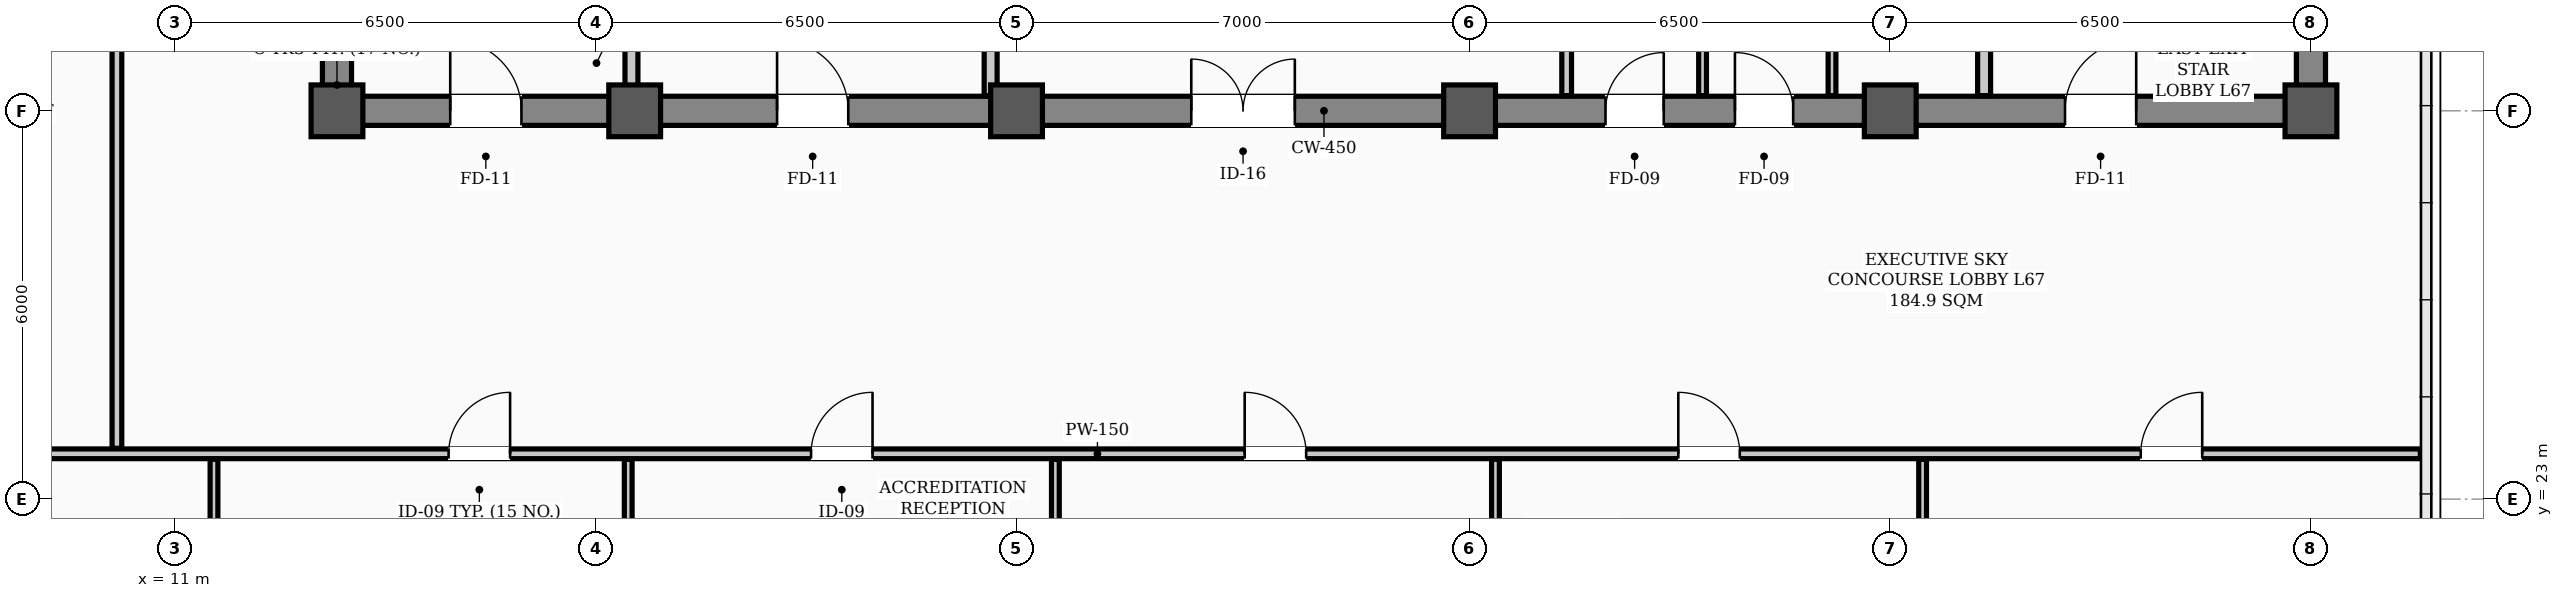
"""IFC4 building model, lengths in metres.
Left out: names, types, materials, properties, quantities, classifications, styles, units other than length and angle.
Written with IfcOpenShell. Run it as: python <this file> out.ifc"""

import sys

from ifc_helpers import new_model, si_unit, direction, frame, frame_2d, origin, origin_2d, place, context, subcontext, project, spatial, rectangle, hollow_rectangle, extrude, element, fill, save


model = new_model("IFC4")
c1 = context("Model", 3, precision=1e-05, world=origin(), true_north=direction((0.0, 1.0)))
c2 = subcontext(c1, "Body", "Model", "MODEL_VIEW")
j1 = project(units=[si_unit("LENGTHUNIT", "METRE"), si_unit("PLANEANGLEUNIT", "RADIAN")], contexts=[c1])
p1 = place(None, origin())
s1 = spatial("IfcSite", under=j1, at=p1, CompositionType="ELEMENT")
p2 = place(p1, origin())
s2 = spatial("IfcBuilding", under=s1, at=p2, CompositionType="ELEMENT")
p3 = place(p2, frame((0.0, 0.0, 269.6)))
s3 = spatial("IfcBuildingStorey", under=s2, at=p3, CompositionType="ELEMENT", Elevation=269.6)
for number, where, z_axis, x_axis in (
    (1, (13.5, 29.0, 0.0), (0.0, 0.0, 1.0), (1.0, 0.0, 0.0)),
    (2, (18.1, 29.0, 0.0), (0.0, 0.0, 1.0), (1.0, 0.0, 0.0)),
    (3, (24.0, 29.0, 0.0), (0.0, 0.0, 1.0), (1.0, 0.0, 0.0)),
    (4, (31.0, 29.0, 0.0), (0.0, 0.0, 1.0), (1.0, 0.0, 0.0)),
    (5, (37.5, 29.0, 0.0), (0.0, 0.0, 1.0), (1.0, 0.0, 0.0)),
    (6, (44.0, 29.0, 0.0), (0.0, 0.0, 1.0), (1.0, 0.0, 0.0)),
):
    element("IfcColumn", number, at=place(p3, frame(where, z_axis=z_axis, x_axis=x_axis)), inside=s3, PredefinedType="COLUMN", context=c2, shape_type="SweptSolid", body=[
        extrude(hollow_rectangle(XDim=0.8, YDim=0.8, WallThickness=0.032, InnerFilletRadius=0.016, OuterFilletRadius=0.048, at=origin_2d()), origin(), (0.0, 0.0, 1.0), 3.9),
    ])
p4 = place(p3, frame((13.5, 29.0, 0.0), z_axis=(0.0, 0.0, 1.0), x_axis=(1.0, 0.0, 0.0)))
e7 = element("IfcWall", 7, at=p4, inside=s3, PredefinedType="SHEAR", context=c2, shape_type="SweptSolid", body=[
    extrude(rectangle(XDim=30.5, YDim=0.45, at=frame_2d((15.25, 0.0))), origin(), (0.0, 0.0, 1.0), 3.72),
])
p5 = place(p4, frame((1.75, 0.0, 0.0)))
e8 = element("IfcOpeningElement", 8, at=p5, cuts=e7, PredefinedType="OPENING", context=c2, shape_type="SweptSolid", body=[
    extrude(rectangle(XDim=1.1, YDim=2.08, at=frame_2d((0.55, 1.04))), frame((0.0, 0.235, 0.0), z_axis=(0.0, -1.0, 0.0), x_axis=(1.0, 0.0, 0.0)), (0.0, 0.0, 1.0), 0.47),
])
p6 = place(p4, frame((26.7, 0.0, 0.0)))
e9 = element("IfcOpeningElement", 9, at=p6, cuts=e7, PredefinedType="OPENING", context=c2, shape_type="SweptSolid", body=[
    extrude(rectangle(XDim=1.1, YDim=2.08, at=frame_2d((0.55, 1.04))), frame((0.0, 0.235, 0.0), z_axis=(0.0, -1.0, 0.0), x_axis=(1.0, 0.0, 0.0)), (0.0, 0.0, 1.0), 0.47),
])
p7 = place(p4, frame((6.8, 0.0, 0.0)))
e10 = element("IfcOpeningElement", 10, at=p7, cuts=e7, PredefinedType="OPENING", context=c2, shape_type="SweptSolid", body=[
    extrude(rectangle(XDim=1.1, YDim=2.08, at=frame_2d((0.55, 1.04))), frame((0.0, 0.235, 0.0), z_axis=(0.0, -1.0, 0.0), x_axis=(1.0, 0.0, 0.0)), (0.0, 0.0, 1.0), 0.47),
])
p8 = place(p4, frame((13.2, 0.0, 0.0)))
e11 = element("IfcOpeningElement", 11, at=p8, cuts=e7, PredefinedType="OPENING", context=c2, shape_type="SweptSolid", body=[
    extrude(rectangle(XDim=1.6, YDim=2.08, at=frame_2d((0.8, 1.04))), frame((0.0, 0.235, 0.0), z_axis=(0.0, -1.0, 0.0), x_axis=(1.0, 0.0, 0.0)), (0.0, 0.0, 1.0), 0.47),
])
p9 = place(p4, frame((19.6, 0.0, 0.0)))
e12 = element("IfcOpeningElement", 12, at=p9, cuts=e7, PredefinedType="OPENING", context=c2, shape_type="SweptSolid", body=[
    extrude(rectangle(XDim=0.9, YDim=2.08, at=frame_2d((0.45, 1.04))), frame((0.0, 0.235, 0.0), z_axis=(0.0, -1.0, 0.0), x_axis=(1.0, 0.0, 0.0)), (0.0, 0.0, 1.0), 0.47),
])
p10 = place(p4, frame((21.6, 0.0, 0.0)))
e13 = element("IfcOpeningElement", 13, at=p10, cuts=e7, PredefinedType="OPENING", context=c2, shape_type="SweptSolid", body=[
    extrude(rectangle(XDim=0.9, YDim=2.08, at=frame_2d((0.45, 1.04))), frame((0.0, 0.235, 0.0), z_axis=(0.0, -1.0, 0.0), x_axis=(1.0, 0.0, 0.0)), (0.0, 0.0, 1.0), 0.47),
])
for number, where, z_axis, x_axis in (
    (14, (13.5, 29.35, 0.0), (0.0, 0.0, 1.0), (0.0, 1.0, 0.0)),
    (15, (44.0, 29.35, 0.0), (0.0, 0.0, 1.0), (0.0, 1.0, 0.0)),
):
    element("IfcWall", number, at=place(p3, frame(where, z_axis=z_axis, x_axis=x_axis)), inside=s3, PredefinedType="SHEAR", context=c2, shape_type="SweptSolid", body=[
        extrude(rectangle(XDim=8.6, YDim=0.45, at=frame_2d((4.3, 0.0))), origin(), (0.0, 0.0, 1.0), 3.72),
    ])
p11 = place(p3, frame((4.81, 23.7, 0.0), z_axis=(0.0, 0.0, 1.0), x_axis=(1.0, 0.0, 0.0)))
e16 = element("IfcWall", 16, at=p11, inside=s3, PredefinedType="PARTITIONING", context=c2, shape_type="SweptSolid", body=[
    extrude(rectangle(XDim=40.88, YDim=0.15, at=frame_2d((20.44, 0.0))), origin(), (0.0, 0.0, 1.0), 3.2),
])
p12 = place(p11, frame((10.415, 0.0, 0.0)))
e17 = element("IfcOpeningElement", 17, at=p12, cuts=e16, PredefinedType="OPENING", context=c2, shape_type="SweptSolid", body=[
    extrude(rectangle(XDim=0.95, YDim=2.08, at=frame_2d((0.475, 1.04))), frame((0.0, 0.085, 0.0), z_axis=(0.0, -1.0, 0.0), x_axis=(1.0, 0.0, 0.0)), (0.0, 0.0, 1.0), 0.17),
])
p13 = place(p11, frame((16.015, 0.0, 0.0)))
e18 = element("IfcOpeningElement", 18, at=p13, cuts=e16, PredefinedType="OPENING", context=c2, shape_type="SweptSolid", body=[
    extrude(rectangle(XDim=0.95, YDim=2.08, at=frame_2d((0.475, 1.04))), frame((0.0, 0.085, 0.0), z_axis=(0.0, -1.0, 0.0), x_axis=(1.0, 0.0, 0.0)), (0.0, 0.0, 1.0), 0.17),
])
p14 = place(p11, frame((22.715, 0.0, 0.0)))
e19 = element("IfcOpeningElement", 19, at=p14, cuts=e16, PredefinedType="OPENING", context=c2, shape_type="SweptSolid", body=[
    extrude(rectangle(XDim=0.95, YDim=2.08, at=frame_2d((0.475, 1.04))), frame((0.0, 0.085, 0.0), z_axis=(0.0, -1.0, 0.0), x_axis=(1.0, 0.0, 0.0)), (0.0, 0.0, 1.0), 0.17),
])
p15 = place(p11, frame((29.415, 0.0, 0.0)))
e20 = element("IfcOpeningElement", 20, at=p15, cuts=e16, PredefinedType="OPENING", context=c2, shape_type="SweptSolid", body=[
    extrude(rectangle(XDim=0.95, YDim=2.08, at=frame_2d((0.475, 1.04))), frame((0.0, 0.085, 0.0), z_axis=(0.0, -1.0, 0.0), x_axis=(1.0, 0.0, 0.0)), (0.0, 0.0, 1.0), 0.17),
])
p16 = place(p11, frame((36.56, 0.0, 0.0)))
e21 = element("IfcOpeningElement", 21, at=p16, cuts=e16, PredefinedType="OPENING", context=c2, shape_type="SweptSolid", body=[
    extrude(rectangle(XDim=0.95, YDim=2.08, at=frame_2d((0.475, 1.04))), frame((0.0, 0.085, 0.0), z_axis=(0.0, -1.0, 0.0), x_axis=(1.0, 0.0, 0.0)), (0.0, 0.0, 1.0), 0.17),
])
p17 = place(p3, frame((18.05, 29.235, 0.0), z_axis=(0.0, 0.0, 1.0), x_axis=(0.0, 1.0, 0.0)))
e22 = element("IfcWall", 22, at=p17, inside=s3, PredefinedType="STANDARD", context=c2, shape_type="SweptSolid", body=[
    extrude(rectangle(XDim=1.065, YDim=0.2, at=frame_2d((0.532, 0.0))), origin(), (0.0, 0.0, 1.0), 3.4),
])
p18 = place(p3, frame((38.95, 29.235, 0.0), z_axis=(0.0, 0.0, 1.0), x_axis=(0.0, 1.0, 0.0)))
e23 = element("IfcWall", 23, at=p18, inside=s3, PredefinedType="STANDARD", context=c2, shape_type="SweptSolid", body=[
    extrude(rectangle(XDim=1.065, YDim=0.2, at=frame_2d((0.532, 0.0))), origin(), (0.0, 0.0, 1.0), 3.72),
])
p19 = place(p3, frame((23.6, 29.235, 0.0), z_axis=(0.0, 0.0, 1.0), x_axis=(0.0, 1.0, 0.0)))
e24 = element("IfcWall", 24, at=p19, inside=s3, PredefinedType="STANDARD", context=c2, shape_type="SweptSolid", body=[
    extrude(rectangle(XDim=5.465, YDim=0.2, at=frame_2d((2.732, 0.0))), origin(), (0.0, 0.0, 1.0), 3.2),
])
p20 = place(p3, frame((32.5, 29.235, 0.0), z_axis=(0.0, 0.0, 1.0), x_axis=(0.0, 1.0, 0.0)))
e25 = element("IfcWall", 25, at=p20, inside=s3, PredefinedType="PARTITIONING", context=c2, shape_type="SweptSolid", body=[
    extrude(rectangle(XDim=2.53, YDim=0.15, at=frame_2d((1.265, 0.0))), origin(), (0.0, 0.0, 1.0), 3.4),
])
for number, where, z_axis, x_axis in (
    (26, (36.6, 29.235, 0.0), (0.0, 0.0, 1.0), (0.0, 1.0, 0.0)),
    (27, (34.6, 29.235, 0.0), (0.0, 0.0, 1.0), (0.0, 1.0, 0.0)),
):
    element("IfcWall", number, at=place(p3, frame(where, z_axis=z_axis, x_axis=x_axis)), inside=s3, PredefinedType="PARTITIONING", context=c2, shape_type="SweptSolid", body=[
        extrude(rectangle(XDim=2.53, YDim=0.12, at=frame_2d((1.265, 0.0))), origin(), (0.0, 0.0, 1.0), 3.4),
    ])
p21 = place(p3, frame((10.1, 23.785, 0.0), z_axis=(0.0, 0.0, 1.0), x_axis=(0.0, 1.0, 0.0)))
e28 = element("IfcWall", 28, at=p21, inside=s3, PredefinedType="PARTITIONING", context=c2, shape_type="SweptSolid", body=[
    extrude(rectangle(XDim=17.88, YDim=0.15, at=frame_2d((8.94, 0.0))), origin(), (0.0, 0.0, 1.0), 3.1),
])
p22 = place(p21, frame((8.465, 0.0, 0.0)))
e29 = element("IfcOpeningElement", 29, at=p22, cuts=e28, PredefinedType="OPENING", context=c2, shape_type="SweptSolid", body=[
    extrude(rectangle(XDim=0.95, YDim=2.08, at=frame_2d((0.475, 1.04))), frame((0.0, 0.085, 0.0), z_axis=(0.0, -1.0, 0.0), x_axis=(1.0, 0.0, 0.0)), (0.0, 0.0, 1.0), 0.17),
])
p23 = place(p3, frame((11.6, 17.91, 0.0), z_axis=(0.0, 0.0, 1.0), x_axis=(0.0, 1.0, 0.0)))
e30 = element("IfcWall", 30, at=p23, inside=s3, PredefinedType="PARTITIONING", context=c2, shape_type="SweptSolid", body=[
    extrude(rectangle(XDim=5.705, YDim=0.12, at=frame_2d((2.853, 0.0))), origin(), (0.0, 0.0, 1.0), 3.72),
])
p24 = place(p23, frame((3.815, 0.0, 0.0)))
e31 = element("IfcOpeningElement", 31, at=p24, cuts=e30, PredefinedType="OPENING", context=c2, shape_type="SweptSolid", body=[
    extrude(rectangle(XDim=0.95, YDim=2.08, at=frame_2d((0.475, 1.04))), frame((0.0, 0.07, 0.0), z_axis=(0.0, -1.0, 0.0), x_axis=(1.0, 0.0, 0.0)), (0.0, 0.0, 1.0), 0.14),
])
p25 = place(p3, frame((18.0, 17.91, 0.0), z_axis=(0.0, 0.0, 1.0), x_axis=(0.0, 1.0, 0.0)))
e32 = element("IfcWall", 32, at=p25, inside=s3, PredefinedType="PARTITIONING", context=c2, shape_type="SweptSolid", body=[
    extrude(rectangle(XDim=5.705, YDim=0.12, at=frame_2d((2.853, 0.0))), origin(), (0.0, 0.0, 1.0), 3.1),
])
p26 = place(p3, frame((24.6, 19.67, 0.0), z_axis=(0.0, 0.0, 1.0), x_axis=(0.0, 1.0, 0.0)))
e33 = element("IfcWall", 33, at=p26, inside=s3, PredefinedType="PARTITIONING", context=c2, shape_type="SweptSolid", body=[
    extrude(rectangle(XDim=3.945, YDim=0.12, at=frame_2d((1.973, 0.0))), origin(), (0.0, 0.0, 1.0), 3.1),
])
for number, where, z_axis, x_axis in (
    (34, (31.4, 17.91, 0.0), (0.0, 0.0, 1.0), (0.0, 1.0, 0.0)),
    (35, (38.0, 17.91, 0.0), (0.0, 0.0, 1.0), (0.0, 1.0, 0.0)),
):
    element("IfcWall", number, at=place(p3, frame(where, z_axis=z_axis, x_axis=x_axis)), inside=s3, PredefinedType="PARTITIONING", context=c2, shape_type="SweptSolid", body=[
        extrude(rectangle(XDim=5.705, YDim=0.12, at=frame_2d((2.853, 0.0))), origin(), (0.0, 0.0, 1.0), 3.1),
    ])
p27 = place(p5, origin())
e36 = element("IfcDoor", 36, at=p27, inside=s3, OperationType="SINGLE_SWING_LEFT", PredefinedType="DOOR", context=c2, shape_type="SweptSolid", body=[
    extrude(rectangle(XDim=1.1, YDim=2.08, at=frame_2d((0.55, 1.04))), frame((0.0, 0.025, 0.0), z_axis=(0.0, -1.0, 0.0), x_axis=(1.0, 0.0, 0.0)), (0.0, 0.0, 1.0), 0.05),
])
fill(e8, e36)
p28 = place(p6, origin())
e37 = element("IfcDoor", 37, at=p28, inside=s3, OperationType="SINGLE_SWING_RIGHT", PredefinedType="DOOR", context=c2, shape_type="SweptSolid", body=[
    extrude(rectangle(XDim=1.1, YDim=2.08, at=frame_2d((0.55, 1.04))), frame((0.0, 0.025, 0.0), z_axis=(0.0, -1.0, 0.0), x_axis=(1.0, 0.0, 0.0)), (0.0, 0.0, 1.0), 0.05),
])
fill(e9, e37)
p29 = place(p7, origin())
e38 = element("IfcDoor", 38, at=p29, inside=s3, OperationType="SINGLE_SWING_LEFT", PredefinedType="DOOR", context=c2, shape_type="SweptSolid", body=[
    extrude(rectangle(XDim=1.1, YDim=2.08, at=frame_2d((0.55, 1.04))), frame((0.0, 0.025, 0.0), z_axis=(0.0, -1.0, 0.0), x_axis=(1.0, 0.0, 0.0)), (0.0, 0.0, 1.0), 0.05),
])
fill(e10, e38)
p30 = place(p8, origin())
e39 = element("IfcDoor", 39, at=p30, inside=s3, OperationType="DOUBLE_DOOR_SINGLE_SWING", PredefinedType="DOOR", context=c2, shape_type="SweptSolid", body=[
    extrude(rectangle(XDim=1.6, YDim=2.08, at=frame_2d((0.8, 1.04))), frame((0.0, 0.025, 0.0), z_axis=(0.0, -1.0, 0.0), x_axis=(1.0, 0.0, 0.0)), (0.0, 0.0, 1.0), 0.05),
])
fill(e11, e39)
p31 = place(p9, origin())
e40 = element("IfcDoor", 40, at=p31, inside=s3, OperationType="SINGLE_SWING_RIGHT", PredefinedType="DOOR", context=c2, shape_type="SweptSolid", body=[
    extrude(rectangle(XDim=0.9, YDim=2.08, at=frame_2d((0.45, 1.04))), frame((0.0, 0.025, 0.0), z_axis=(0.0, -1.0, 0.0), x_axis=(1.0, 0.0, 0.0)), (0.0, 0.0, 1.0), 0.05),
])
fill(e12, e40)
p32 = place(p10, origin())
e41 = element("IfcDoor", 41, at=p32, inside=s3, OperationType="SINGLE_SWING_LEFT", PredefinedType="DOOR", context=c2, shape_type="SweptSolid", body=[
    extrude(rectangle(XDim=0.9, YDim=2.08, at=frame_2d((0.45, 1.04))), frame((0.0, 0.025, 0.0), z_axis=(0.0, -1.0, 0.0), x_axis=(1.0, 0.0, 0.0)), (0.0, 0.0, 1.0), 0.05),
])
fill(e13, e41)
p33 = place(p12, origin())
e42 = element("IfcDoor", 42, at=p33, inside=s3, OperationType="SINGLE_SWING_RIGHT", PredefinedType="DOOR", context=c2, shape_type="SweptSolid", body=[
    extrude(rectangle(XDim=0.95, YDim=2.08, at=frame_2d((0.475, 1.04))), frame((0.0, 0.025, 0.0), z_axis=(0.0, -1.0, 0.0), x_axis=(1.0, 0.0, 0.0)), (0.0, 0.0, 1.0), 0.05),
])
fill(e17, e42)
p34 = place(p13, origin())
e43 = element("IfcDoor", 43, at=p34, inside=s3, OperationType="SINGLE_SWING_RIGHT", PredefinedType="DOOR", context=c2, shape_type="SweptSolid", body=[
    extrude(rectangle(XDim=0.95, YDim=2.08, at=frame_2d((0.475, 1.04))), frame((0.0, 0.025, 0.0), z_axis=(0.0, -1.0, 0.0), x_axis=(1.0, 0.0, 0.0)), (0.0, 0.0, 1.0), 0.05),
])
fill(e18, e43)
p35 = place(p14, origin())
e44 = element("IfcDoor", 44, at=p35, inside=s3, OperationType="SINGLE_SWING_LEFT", PredefinedType="DOOR", context=c2, shape_type="SweptSolid", body=[
    extrude(rectangle(XDim=0.95, YDim=2.08, at=frame_2d((0.475, 1.04))), frame((0.0, 0.025, 0.0), z_axis=(0.0, -1.0, 0.0), x_axis=(1.0, 0.0, 0.0)), (0.0, 0.0, 1.0), 0.05),
])
fill(e19, e44)
p36 = place(p15, origin())
e45 = element("IfcDoor", 45, at=p36, inside=s3, OperationType="SINGLE_SWING_LEFT", PredefinedType="DOOR", context=c2, shape_type="SweptSolid", body=[
    extrude(rectangle(XDim=0.95, YDim=2.08, at=frame_2d((0.475, 1.04))), frame((0.0, 0.025, 0.0), z_axis=(0.0, -1.0, 0.0), x_axis=(1.0, 0.0, 0.0)), (0.0, 0.0, 1.0), 0.05),
])
fill(e20, e45)
p37 = place(p16, origin())
e46 = element("IfcDoor", 46, at=p37, inside=s3, OperationType="SINGLE_SWING_RIGHT", PredefinedType="DOOR", context=c2, shape_type="SweptSolid", body=[
    extrude(rectangle(XDim=0.95, YDim=2.08, at=frame_2d((0.475, 1.04))), frame((0.0, 0.025, 0.0), z_axis=(0.0, -1.0, 0.0), x_axis=(1.0, 0.0, 0.0)), (0.0, 0.0, 1.0), 0.05),
])
fill(e21, e46)
save(model, sys.argv[1])
